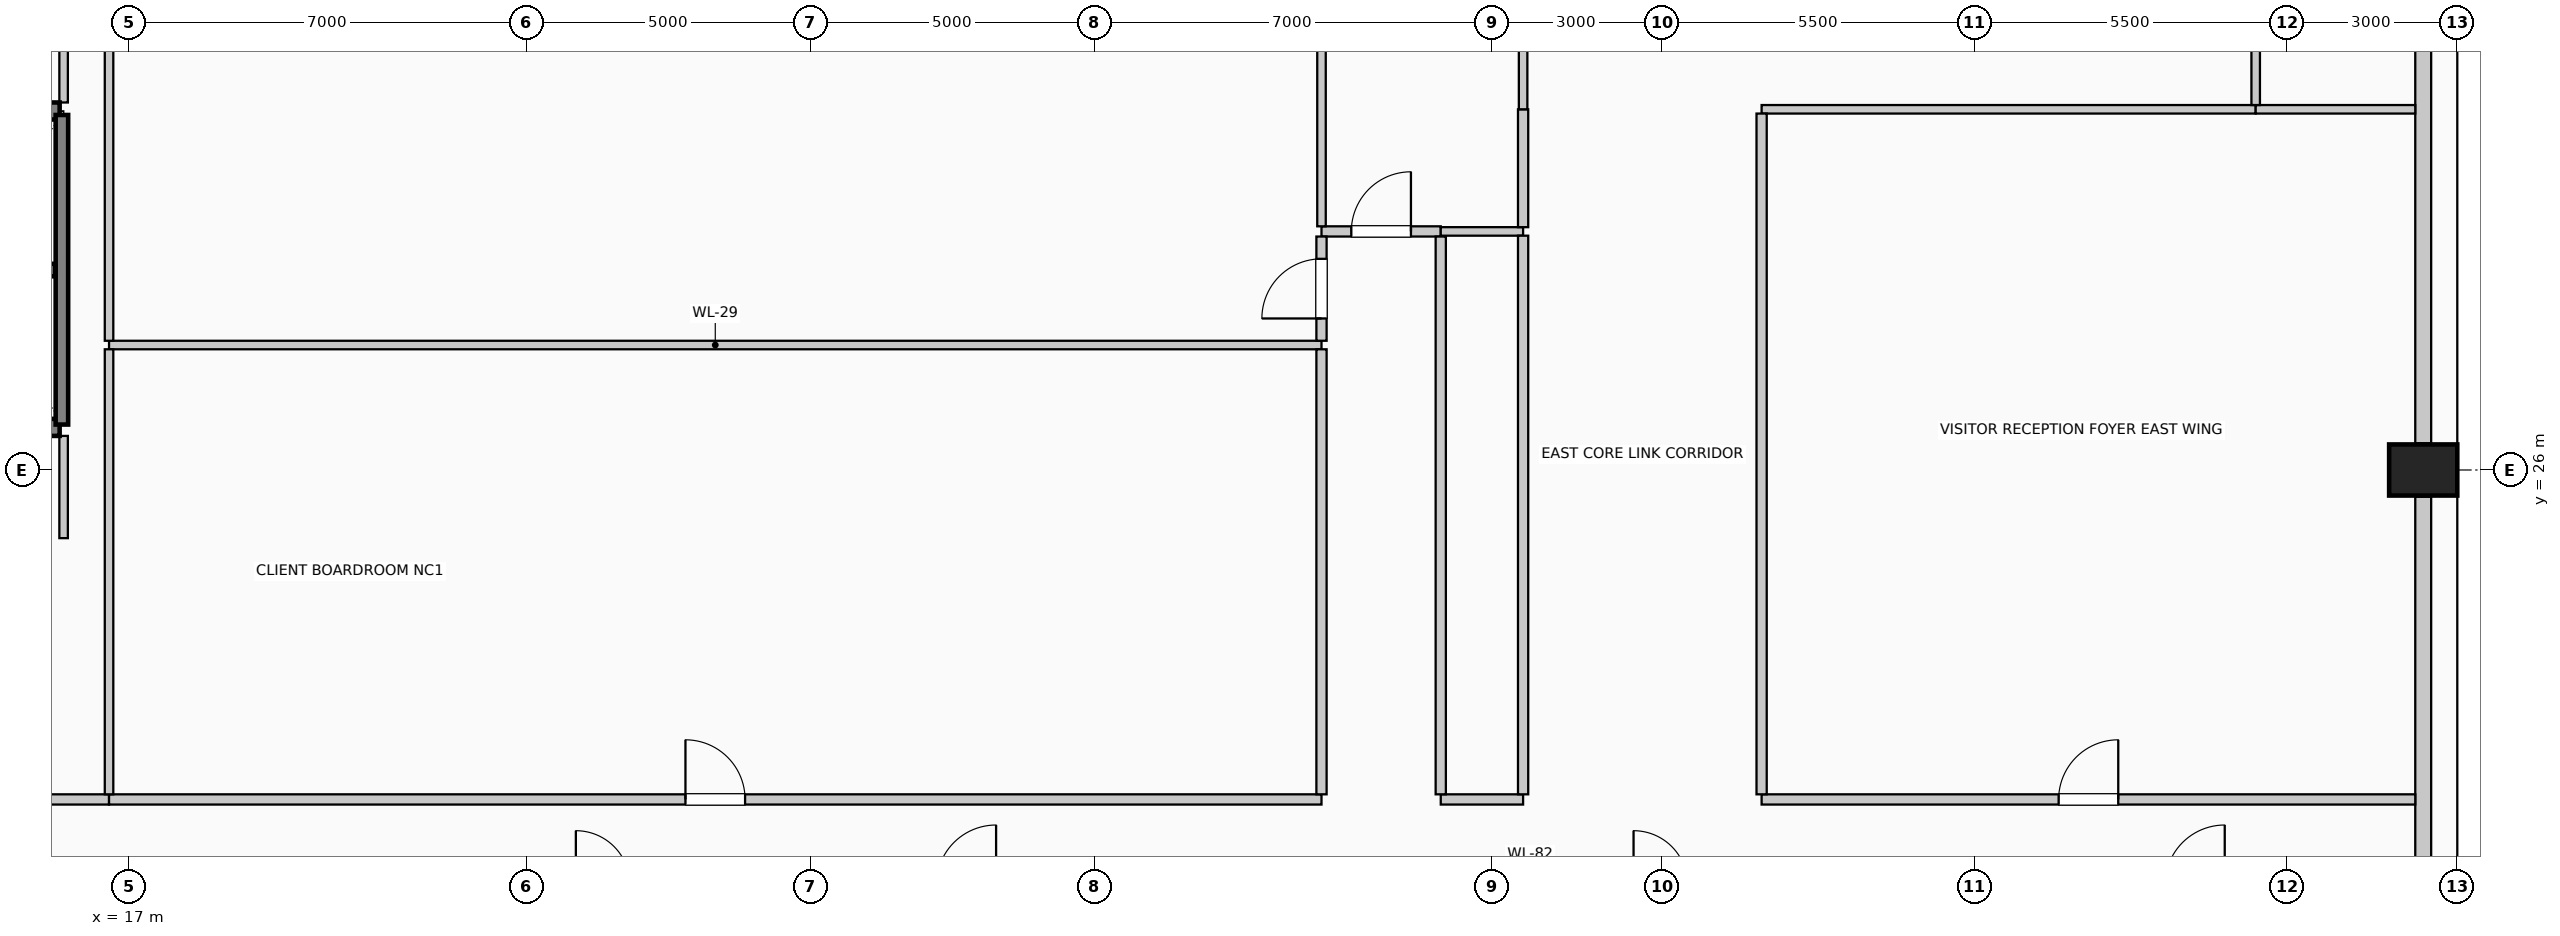
"""IFC4 building model, lengths in metres.
Left out: names, types, materials, properties, quantities, classifications, styles, units other than length and angle.
Written with IfcOpenShell. Run it as: python <this file> out.ifc"""

import sys

from ifc_helpers import new_model, si_unit, direction, frame, frame_2d, origin, origin_2d, place, context, subcontext, project, spatial, rectangle, extrude, element, fill, save


model = new_model("IFC4")
c1 = context("Model", 3, precision=1e-05, world=origin(), true_north=direction((0.0, 1.0)))
c2 = subcontext(c1, "Body", "Model", "MODEL_VIEW")
j1 = project(units=[si_unit("LENGTHUNIT", "METRE"), si_unit("PLANEANGLEUNIT", "RADIAN")], contexts=[c1])
p1 = place(None, origin())
s1 = spatial("IfcSite", under=j1, at=p1, CompositionType="ELEMENT")
p2 = place(p1, origin())
s2 = spatial("IfcBuilding", under=s1, at=p2, CompositionType="ELEMENT")
p3 = place(p2, frame((0.0, 0.0, 70.6)))
s3 = spatial("IfcBuildingStorey", under=s2, at=p3, CompositionType="ELEMENT", Elevation=70.6)
p4 = place(p3, frame((57.4, 26.0, 0.0), z_axis=(0.0, 0.0, 1.0), x_axis=(0.0, 1.0, 0.0)))
e1 = element("IfcColumn", 1, at=p4, inside=s3, PredefinedType="COLUMN", context=c2, shape_type="SweptSolid", body=[
    extrude(rectangle(XDim=0.9, YDim=1.2, at=origin_2d()), origin(), (0.0, 0.0, 1.0), 4.0),
])
for number, where, z_axis, x_axis in (
    (2, (57.4, 25.53, 0.0), (0.0, 0.0, 1.0), (0.0, -1.0, 0.0)),
    (3, (57.4, 33.53, 0.0), (0.0, 0.0, 1.0), (0.0, -1.0, 0.0)),
):
    element("IfcWall", number, at=place(p3, frame(where, z_axis=z_axis, x_axis=x_axis)), inside=s3, PredefinedType="SOLIDWALL", context=c2, shape_type="SweptSolid", body=[
        extrude(rectangle(XDim=7.06, YDim=0.28, at=frame_2d((3.53, 0.0))), origin(), (0.0, 0.0, 1.0), 2.85),
    ])
for number, where, z_axis, x_axis in (
    (4, (15.78, 26.75, 0.0), (0.0, 0.0, 1.0), (-1.0, 0.0, 0.0)),
    (5, (14.0, 32.32, 0.0), (0.0, 0.0, 1.0), (1.0, 0.0, 0.0)),
):
    element("IfcWall", number, at=place(p3, frame(where, z_axis=z_axis, x_axis=x_axis)), inside=s3, PredefinedType="SOLIDWALL", context=c2, shape_type="SweptSolid", body=[
        extrude(rectangle(XDim=1.78, YDim=0.3, at=frame_2d((0.89, 0.0))), origin(), (0.0, 0.0, 1.0), 4.0),
    ])
p5 = place(p3, frame((15.82, 26.8, 0.0), z_axis=(0.0, 0.0, 1.0), x_axis=(0.0, 1.0, 0.0)))
e6 = element("IfcWall", 6, at=p5, inside=s3, PredefinedType="SOLIDWALL", context=c2, shape_type="SweptSolid", body=[
    extrude(rectangle(XDim=5.45, YDim=0.22, at=frame_2d((2.725, 0.0))), origin(), (0.0, 0.0, 1.0), 4.0),
])
p6 = place(p3, frame((12.3, 29.52, 0.0), z_axis=(0.0, 0.0, 1.0), x_axis=(1.0, 0.0, 0.0)))
e7 = element("IfcWall", 7, at=p6, inside=s3, PredefinedType="SOLIDWALL", context=c2, shape_type="SweptSolid", body=[
    extrude(rectangle(XDim=3.4, YDim=0.22, at=frame_2d((1.7, 0.0))), origin(), (0.0, 0.0, 1.0), 4.0),
])
p7 = place(p3, frame((12.2, 20.2, 0.0), z_axis=(0.0, 0.0, 1.0), x_axis=(1.0, 0.0, 0.0)))
e8 = element("IfcWall", 8, at=p7, inside=s3, PredefinedType="PARTITIONING", context=c2, shape_type="SweptSolid", body=[
    extrude(rectangle(XDim=4.45, YDim=0.18, at=frame_2d((2.225, 0.0))), origin(), (0.0, 0.0, 1.0), 3.7),
])
p8 = place(p3, frame((16.65, 20.2, 0.0), z_axis=(0.0, 0.0, 1.0), x_axis=(1.0, 0.0, 0.0)))
e9 = element("IfcWall", 9, at=p8, inside=s3, PredefinedType="PARTITIONING", context=c2, shape_type="SweptSolid", body=[
    extrude(rectangle(XDim=21.35, YDim=0.18, at=frame_2d((10.675, 0.0))), origin(), (0.0, 0.0, 1.0), 3.7),
])
p9 = place(p8, frame((10.15, 0.0, 0.0)))
e10 = element("IfcOpeningElement", 10, at=p9, cuts=e9, PredefinedType="OPENING", context=c2, shape_type="SweptSolid", body=[
    extrude(rectangle(XDim=1.05, YDim=2.15, at=frame_2d((0.525, 1.075))), frame((0.0, 0.1, 0.0), z_axis=(0.0, -1.0, 0.0), x_axis=(1.0, 0.0, 0.0)), (0.0, 0.0, 1.0), 0.2),
])
p10 = place(p3, frame((40.1, 20.2, 0.0), z_axis=(0.0, 0.0, 1.0), x_axis=(1.0, 0.0, 0.0)))
e11 = element("IfcWall", 11, at=p10, inside=s3, PredefinedType="PARTITIONING", context=c2, shape_type="SweptSolid", body=[
    extrude(rectangle(XDim=1.45, YDim=0.18, at=frame_2d((0.725, 0.0))), origin(), (0.0, 0.0, 1.0), 3.7),
])
p11 = place(p3, frame((45.75, 20.2, 0.0), z_axis=(0.0, 0.0, 1.0), x_axis=(1.0, 0.0, 0.0)))
e12 = element("IfcWall", 12, at=p11, inside=s3, PredefinedType="PARTITIONING", context=c2, shape_type="SweptSolid", body=[
    extrude(rectangle(XDim=11.51, YDim=0.18, at=frame_2d((5.755, 0.0))), origin(), (0.0, 0.0, 1.0), 3.7),
])
p12 = place(p11, frame((5.23, 0.0, 0.0)))
e13 = element("IfcOpeningElement", 13, at=p12, cuts=e12, PredefinedType="OPENING", context=c2, shape_type="SweptSolid", body=[
    extrude(rectangle(XDim=1.05, YDim=2.15, at=frame_2d((0.525, 1.075))), frame((0.0, 0.1, 0.0), z_axis=(0.0, -1.0, 0.0), x_axis=(1.0, 0.0, 0.0)), (0.0, 0.0, 1.0), 0.2),
])
p13 = place(p3, frame((16.65, 28.2, 0.0), z_axis=(0.0, 0.0, 1.0), x_axis=(1.0, 0.0, 0.0)))
e14 = element("IfcWall", 14, at=p13, inside=s3, PredefinedType="PARTITIONING", context=c2, shape_type="SweptSolid", body=[
    extrude(rectangle(XDim=21.35, YDim=0.15, at=frame_2d((10.675, 0.0))), origin(), (0.0, 0.0, 1.0), 3.7),
])
p14 = place(p3, frame((38.0, 30.2, 0.0), z_axis=(0.0, 0.0, 1.0), x_axis=(1.0, 0.0, 0.0)))
e15 = element("IfcWall", 15, at=p14, inside=s3, PredefinedType="PARTITIONING", context=c2, shape_type="SweptSolid", body=[
    extrude(rectangle(XDim=2.1, YDim=0.18, at=frame_2d((1.05, 0.0))), origin(), (0.0, 0.0, 1.0), 3.7),
])
p15 = place(p14, frame((0.525, 0.0, 0.0)))
e16 = element("IfcOpeningElement", 16, at=p15, cuts=e15, PredefinedType="OPENING", context=c2, shape_type="SweptSolid", body=[
    extrude(rectangle(XDim=1.05, YDim=2.15, at=frame_2d((0.525, 1.075))), frame((0.0, 0.1, 0.0), z_axis=(0.0, -1.0, 0.0), x_axis=(1.0, 0.0, 0.0)), (0.0, 0.0, 1.0), 0.2),
])
p16 = place(p3, frame((40.1, 30.2, 0.0), z_axis=(0.0, 0.0, 1.0), x_axis=(1.0, 0.0, 0.0)))
e17 = element("IfcWall", 17, at=p16, inside=s3, PredefinedType="PARTITIONING", context=c2, shape_type="SweptSolid", body=[
    extrude(rectangle(XDim=1.45, YDim=0.15, at=frame_2d((0.725, 0.0))), origin(), (0.0, 0.0, 1.0), 3.7),
])
p17 = place(p3, frame((45.75, 32.35, 0.0), z_axis=(0.0, 0.0, 1.0), x_axis=(1.0, 0.0, 0.0)))
e18 = element("IfcWall", 18, at=p17, inside=s3, PredefinedType="PARTITIONING", context=c2, shape_type="SweptSolid", body=[
    extrude(rectangle(XDim=8.7, YDim=0.15, at=frame_2d((4.35, 0.0))), origin(), (0.0, 0.0, 1.0), 3.7),
])
p18 = place(p3, frame((54.45, 32.35, 0.0), z_axis=(0.0, 0.0, 1.0), x_axis=(1.0, 0.0, 0.0)))
e19 = element("IfcWall", 19, at=p18, inside=s3, PredefinedType="PARTITIONING", context=c2, shape_type="SweptSolid", body=[
    extrude(rectangle(XDim=2.81, YDim=0.15, at=frame_2d((1.405, 0.0))), origin(), (0.0, 0.0, 1.0), 3.7),
])
p19 = place(p3, frame((15.85, 24.8, 0.0), z_axis=(0.0, 0.0, 1.0), x_axis=(0.0, 1.0, 0.0)))
e20 = element("IfcWall", 20, at=p19, inside=s3, PredefinedType="PARTITIONING", context=c2, shape_type="SweptSolid", body=[
    extrude(rectangle(XDim=1.8, YDim=0.15, at=frame_2d((0.9, 0.0))), origin(), (0.0, 0.0, 1.0), 3.7),
])
p20 = place(p3, frame((15.85, 32.47, 0.0), z_axis=(0.0, 0.0, 1.0), x_axis=(0.0, 1.0, 0.0)))
e21 = element("IfcWall", 21, at=p20, inside=s3, PredefinedType="PARTITIONING", context=c2, shape_type="SweptSolid", body=[
    extrude(rectangle(XDim=1.03, YDim=0.15, at=frame_2d((0.515, 0.0))), origin(), (0.0, 0.0, 1.0), 3.7),
])
p21 = place(p3, frame((16.65, 20.29, 0.0), z_axis=(0.0, 0.0, 1.0), x_axis=(0.0, 1.0, 0.0)))
e22 = element("IfcWall", 22, at=p21, inside=s3, PredefinedType="PARTITIONING", context=c2, shape_type="SweptSolid", body=[
    extrude(rectangle(XDim=7.835, YDim=0.15, at=frame_2d((3.917, 0.0))), origin(), (0.0, 0.0, 1.0), 2.995),
])
p22 = place(p3, frame((16.65, 28.275, 0.0), z_axis=(0.0, 0.0, 1.0), x_axis=(0.0, 1.0, 0.0)))
e23 = element("IfcWall", 23, at=p22, inside=s3, PredefinedType="PARTITIONING", context=c2, shape_type="SweptSolid", body=[
    extrude(rectangle(XDim=5.225, YDim=0.15, at=frame_2d((2.613, 0.0))), origin(), (0.0, 0.0, 1.0), 2.995),
])
p23 = place(p3, frame((38.0, 20.29, 0.0), z_axis=(0.0, 0.0, 1.0), x_axis=(0.0, 1.0, 0.0)))
e24 = element("IfcWall", 24, at=p23, inside=s3, PredefinedType="PARTITIONING", context=c2, shape_type="SweptSolid", body=[
    extrude(rectangle(XDim=7.835, YDim=0.18, at=frame_2d((3.917, 0.0))), origin(), (0.0, 0.0, 1.0), 3.7),
])
p24 = place(p3, frame((38.0, 28.275, 0.0), z_axis=(0.0, 0.0, 1.0), x_axis=(0.0, 1.0, 0.0)))
e25 = element("IfcWall", 25, at=p24, inside=s3, PredefinedType="PARTITIONING", context=c2, shape_type="SweptSolid", body=[
    extrude(rectangle(XDim=1.835, YDim=0.18, at=frame_2d((0.917, 0.0))), origin(), (0.0, 0.0, 1.0), 3.7),
])
p25 = place(p24, frame((0.393, 0.0, 0.0)))
e26 = element("IfcOpeningElement", 26, at=p25, cuts=e25, PredefinedType="OPENING", context=c2, shape_type="SweptSolid", body=[
    extrude(rectangle(XDim=1.05, YDim=2.15, at=frame_2d((0.525, 1.075))), frame((0.0, 0.1, 0.0), z_axis=(0.0, -1.0, 0.0), x_axis=(1.0, 0.0, 0.0)), (0.0, 0.0, 1.0), 0.2),
])
p26 = place(p3, frame((38.0, 30.29, 0.0), z_axis=(0.0, 0.0, 1.0), x_axis=(0.0, 1.0, 0.0)))
e27 = element("IfcWall", 27, at=p26, inside=s3, PredefinedType="PARTITIONING", context=c2, shape_type="SweptSolid", body=[
    extrude(rectangle(XDim=14.97, YDim=0.15, at=frame_2d((7.485, 0.0))), origin(), (0.0, 0.0, 1.0), 3.7),
])
p27 = place(p3, frame((40.1, 20.29, 0.0), z_axis=(0.0, 0.0, 1.0), x_axis=(0.0, 1.0, 0.0)))
e28 = element("IfcWall", 28, at=p27, inside=s3, PredefinedType="PARTITIONING", context=c2, shape_type="SweptSolid", body=[
    extrude(rectangle(XDim=9.82, YDim=0.18, at=frame_2d((4.91, 0.0))), origin(), (0.0, 0.0, 1.0), 3.7),
])
p28 = place(p3, frame((41.55, 20.29, 0.0), z_axis=(0.0, 0.0, 1.0), x_axis=(0.0, 1.0, 0.0)))
e29 = element("IfcWall", 29, at=p28, inside=s3, PredefinedType="PARTITIONING", context=c2, shape_type="SweptSolid", body=[
    extrude(rectangle(XDim=9.835, YDim=0.18, at=frame_2d((4.917, 0.0))), origin(), (0.0, 0.0, 1.0), 2.995),
])
p29 = place(p3, frame((41.55, 30.275, 0.0), z_axis=(0.0, 0.0, 1.0), x_axis=(0.0, 1.0, 0.0)))
e30 = element("IfcWall", 30, at=p29, inside=s3, PredefinedType="PARTITIONING", context=c2, shape_type="SweptSolid", body=[
    extrude(rectangle(XDim=2.075, YDim=0.18, at=frame_2d((1.038, 0.0))), origin(), (0.0, 0.0, 1.0), 2.995),
])
p30 = place(p3, frame((41.55, 32.35, 0.0), z_axis=(0.0, 0.0, 1.0), x_axis=(0.0, 1.0, 0.0)))
e31 = element("IfcWall", 31, at=p30, inside=s3, PredefinedType="PARTITIONING", context=c2, shape_type="SweptSolid", body=[
    extrude(rectangle(XDim=1.15, YDim=0.15, at=frame_2d((0.575, 0.0))), origin(), (0.0, 0.0, 1.0), 2.995),
])
p31 = place(p3, frame((45.75, 20.29, 0.0), z_axis=(0.0, 0.0, 1.0), x_axis=(0.0, 1.0, 0.0)))
e32 = element("IfcWall", 32, at=p31, inside=s3, PredefinedType="PARTITIONING", context=c2, shape_type="SweptSolid", body=[
    extrude(rectangle(XDim=11.985, YDim=0.18, at=frame_2d((5.992, 0.0))), origin(), (0.0, 0.0, 1.0), 3.7),
])
p32 = place(p3, frame((54.45, 32.425, 0.0), z_axis=(0.0, 0.0, 1.0), x_axis=(0.0, 1.0, 0.0)))
e33 = element("IfcWall", 33, at=p32, inside=s3, PredefinedType="PARTITIONING", context=c2, shape_type="SweptSolid", body=[
    extrude(rectangle(XDim=1.725, YDim=0.15, at=frame_2d((0.862, 0.0))), origin(), (0.0, 0.0, 1.0), 3.7),
])
p33 = place(p9, origin())
e34 = element("IfcDoor", 34, at=p33, inside=s3, OperationType="SINGLE_SWING_LEFT", PredefinedType="DOOR", context=c2, shape_type="SweptSolid", body=[
    extrude(rectangle(XDim=1.05, YDim=2.15, at=frame_2d((0.525, 1.075))), frame((0.0, 0.025, 0.0), z_axis=(0.0, -1.0, 0.0), x_axis=(1.0, 0.0, 0.0)), (0.0, 0.0, 1.0), 0.05),
])
fill(e10, e34)
p34 = place(p12, origin())
e35 = element("IfcDoor", 35, at=p34, inside=s3, OperationType="SINGLE_SWING_RIGHT", PredefinedType="DOOR", context=c2, shape_type="SweptSolid", body=[
    extrude(rectangle(XDim=1.05, YDim=2.15, at=frame_2d((0.525, 1.075))), frame((0.0, 0.025, 0.0), z_axis=(0.0, -1.0, 0.0), x_axis=(1.0, 0.0, 0.0)), (0.0, 0.0, 1.0), 0.05),
])
fill(e13, e35)
p35 = place(p15, origin())
e36 = element("IfcDoor", 36, at=p35, inside=s3, OperationType="SINGLE_SWING_RIGHT", PredefinedType="DOOR", context=c2, shape_type="SweptSolid", body=[
    extrude(rectangle(XDim=1.05, YDim=2.15, at=frame_2d((0.525, 1.075))), frame((0.0, 0.025, 0.0), z_axis=(0.0, -1.0, 0.0), x_axis=(1.0, 0.0, 0.0)), (0.0, 0.0, 1.0), 0.05),
])
fill(e16, e36)
p36 = place(p25, origin())
e37 = element("IfcDoor", 37, at=p36, inside=s3, OperationType="SINGLE_SWING_LEFT", PredefinedType="DOOR", context=c2, shape_type="SweptSolid", body=[
    extrude(rectangle(XDim=1.05, YDim=2.15, at=frame_2d((0.525, 1.075))), frame((0.0, 0.025, 0.0), z_axis=(0.0, -1.0, 0.0), x_axis=(1.0, 0.0, 0.0)), (0.0, 0.0, 1.0), 0.05),
])
fill(e26, e37)
save(model, sys.argv[1])
